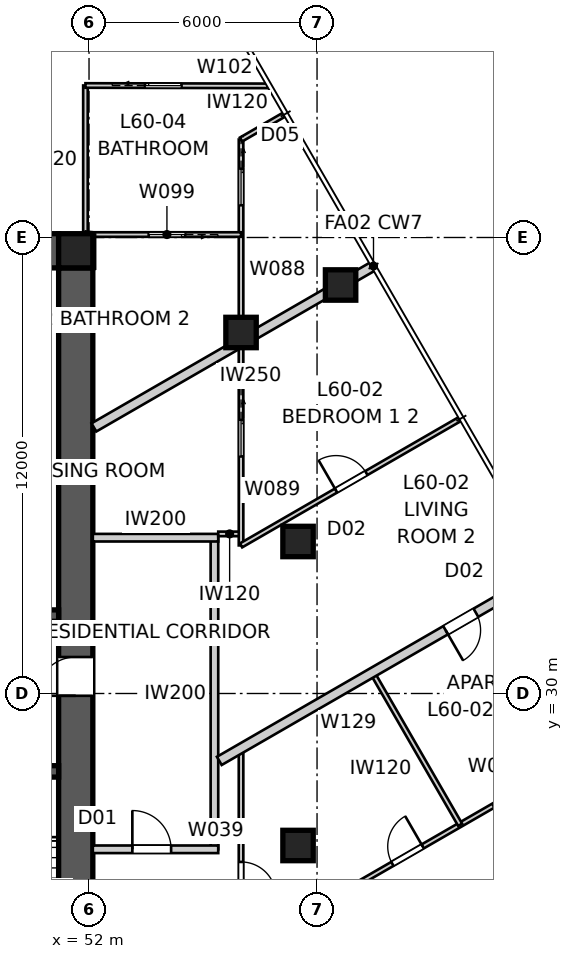
"""IFC4 building model, lengths in metres.
Left out: names, types, materials, properties, quantities, classifications, styles, units other than length and angle.
Written with IfcOpenShell. Run it as: python <this file> out.ifc"""

import sys

from ifc_helpers import new_model, si_unit, direction, frame, frame_2d, origin, origin_2d, place, context, subcontext, project, spatial, polyline, rectangle, outline, extrude, element, fill, save


model = new_model("IFC4")
c1 = context("Model", 3, precision=1e-05, world=origin(), true_north=direction((0.0, 1.0)))
c2 = subcontext(c1, "Body", "Model", "MODEL_VIEW")
j1 = project(units=[si_unit("LENGTHUNIT", "METRE"), si_unit("PLANEANGLEUNIT", "RADIAN")], contexts=[c1])
p1 = place(None, origin())
s1 = spatial("IfcSite", under=j1, at=p1, CompositionType="ELEMENT")
p2 = place(p1, origin())
s2 = spatial("IfcBuilding", under=s1, at=p2, CompositionType="ELEMENT")
p3 = place(p2, frame((0.0, 0.0, 218.4)))
s3 = spatial("IfcBuildingStorey", under=s2, at=p3, CompositionType="ELEMENT", Elevation=218.4)
p4 = place(p3, frame((28.8, 41.65, 0.0), z_axis=(0.0, 0.0, 1.0), x_axis=(1.0, 0.0, 0.0)))
e1 = element("IfcWall", 1, at=p4, inside=s3, PredefinedType="SHEAR", context=c2, shape_type="SweptSolid", body=[
    extrude(outline(polyline([(0.0, -0.45), (22.4, -0.45), (22.4, -0.025), (22.85, -0.025), (22.85, 0.025), (22.4, 0.025), (22.4, 0.45), (0.0, 0.45), (0.0, 0.025), (-0.45, 0.025), (-0.45, -0.025), (0.0, -0.025), (0.0, -0.45)])), origin(), (0.0, 0.0, 1.0), 3.4),
])
p5 = place(p3, frame((51.65, 18.8, 0.0), z_axis=(0.0, 0.0, 1.0), x_axis=(0.0, 1.0, 0.0)))
e2 = element("IfcWall", 2, at=p5, inside=s3, PredefinedType="SHEAR", context=c2, shape_type="SweptSolid", body=[
    extrude(outline(polyline([(0.0, -0.45), (22.4, -0.45), (22.4, -0.025), (22.85, -0.025), (22.85, 0.025), (22.4, 0.025), (22.4, 0.45), (0.0, 0.45), (0.0, 0.025), (-0.45, 0.025), (-0.45, -0.025), (0.0, -0.025), (0.0, -0.45)])), origin(), (0.0, 0.0, 1.0), 3.4),
])
p6 = place(p5, frame((11.14, 0.0, 0.0)))
e3 = element("IfcOpeningElement", 3, at=p6, cuts=e2, PredefinedType="OPENING", context=c2, shape_type="SweptSolid", body=[
    extrude(rectangle(XDim=1.02, YDim=2.4, at=frame_2d((0.51, 1.2))), frame((0.0, 0.46, 0.0), z_axis=(0.0, -1.0, 0.0), x_axis=(1.0, 0.0, 0.0)), (0.0, 0.0, 1.0), 0.92),
])
p7 = place(p3, frame((28.8, 32.05, 0.0), z_axis=(0.0, 0.0, 1.0), x_axis=(1.0, 0.0, 0.0)))
e4 = element("IfcWall", 4, at=p7, inside=s3, PredefinedType="SHEAR", context=c2, shape_type="SweptSolid", body=[
    extrude(rectangle(XDim=22.4, YDim=0.3, at=frame_2d((11.2, 0.0))), origin(), (0.0, 0.0, 1.0), 3.4),
])
p8 = place(p7, frame((19.04, 0.0, 0.0)))
e5 = element("IfcOpeningElement", 5, at=p8, cuts=e4, PredefinedType="OPENING", context=c2, shape_type="SweptSolid", body=[
    extrude(rectangle(XDim=0.92, YDim=2.1, at=frame_2d((0.46, 1.05))), frame((0.0, 0.16, 0.0), z_axis=(0.0, -1.0, 0.0), x_axis=(1.0, 0.0, 0.0)), (0.0, 0.0, 1.0), 0.32),
])
p9 = place(p7, frame((1.265, 0.0, 0.0)))
e6 = element("IfcOpeningElement", 6, at=p9, cuts=e4, PredefinedType="OPENING", context=c2, shape_type="SweptSolid", body=[
    extrude(rectangle(XDim=1.02, YDim=2.1, at=frame_2d((0.51, 1.05))), frame((0.0, 0.16, 0.0), z_axis=(0.0, -1.0, 0.0), x_axis=(1.0, 0.0, 0.0)), (0.0, 0.0, 1.0), 0.32),
])
p10 = place(p7, frame((4.015, 0.0, 0.0)))
e7 = element("IfcOpeningElement", 7, at=p10, cuts=e4, PredefinedType="OPENING", context=c2, shape_type="SweptSolid", body=[
    extrude(rectangle(XDim=0.92, YDim=2.1, at=frame_2d((0.46, 1.05))), frame((0.0, 0.16, 0.0), z_axis=(0.0, -1.0, 0.0), x_axis=(1.0, 0.0, 0.0)), (0.0, 0.0, 1.0), 0.32),
])
p11 = place(p7, frame((6.565, 0.0, 0.0)))
e8 = element("IfcOpeningElement", 8, at=p11, cuts=e4, PredefinedType="OPENING", context=c2, shape_type="SweptSolid", body=[
    extrude(rectangle(XDim=0.92, YDim=2.1, at=frame_2d((0.46, 1.05))), frame((0.0, 0.16, 0.0), z_axis=(0.0, -1.0, 0.0), x_axis=(1.0, 0.0, 0.0)), (0.0, 0.0, 1.0), 0.32),
])
p12 = place(p7, frame((8.89, 0.0, 0.0)))
e9 = element("IfcOpeningElement", 9, at=p12, cuts=e4, PredefinedType="OPENING", context=c2, shape_type="SweptSolid", body=[
    extrude(rectangle(XDim=0.92, YDim=2.1, at=frame_2d((0.46, 1.05))), frame((0.0, 0.16, 0.0), z_axis=(0.0, -1.0, 0.0), x_axis=(1.0, 0.0, 0.0)), (0.0, 0.0, 1.0), 0.32),
])
p13 = place(p7, frame((12.05, 0.0, 0.0)))
e10 = element("IfcOpeningElement", 10, at=p13, cuts=e4, PredefinedType="OPENING", context=c2, shape_type="SweptSolid", body=[
    extrude(rectangle(XDim=1.1, YDim=2.1, at=frame_2d((0.55, 1.05))), frame((0.0, 0.16, 0.0), z_axis=(0.0, -1.0, 0.0), x_axis=(1.0, 0.0, 0.0)), (0.0, 0.0, 1.0), 0.32),
])
p14 = place(p7, frame((14.85, 0.0, 0.0)))
e11 = element("IfcOpeningElement", 11, at=p14, cuts=e4, PredefinedType="OPENING", context=c2, shape_type="SweptSolid", body=[
    extrude(rectangle(XDim=1.1, YDim=2.1, at=frame_2d((0.55, 1.05))), frame((0.0, 0.16, 0.0), z_axis=(0.0, -1.0, 0.0), x_axis=(1.0, 0.0, 0.0)), (0.0, 0.0, 1.0), 0.32),
])
p15 = place(p3, frame((51.2, 27.95, 0.0), z_axis=(0.0, 0.0, 1.0), x_axis=(-1.0, 0.0, 0.0)))
e12 = element("IfcWall", 12, at=p15, inside=s3, PredefinedType="SHEAR", context=c2, shape_type="SweptSolid", body=[
    extrude(rectangle(XDim=22.4, YDim=0.3, at=frame_2d((11.2, 0.0))), origin(), (0.0, 0.0, 1.0), 3.4),
])
p16 = place(p15, frame((19.04, 0.0, 0.0)))
e13 = element("IfcOpeningElement", 13, at=p16, cuts=e12, PredefinedType="OPENING", context=c2, shape_type="SweptSolid", body=[
    extrude(rectangle(XDim=0.92, YDim=2.1, at=frame_2d((0.46, 1.05))), frame((0.0, 0.16, 0.0), z_axis=(0.0, -1.0, 0.0), x_axis=(1.0, 0.0, 0.0)), (0.0, 0.0, 1.0), 0.32),
])
p17 = place(p15, frame((1.265, 0.0, 0.0)))
e14 = element("IfcOpeningElement", 14, at=p17, cuts=e12, PredefinedType="OPENING", context=c2, shape_type="SweptSolid", body=[
    extrude(rectangle(XDim=1.02, YDim=2.1, at=frame_2d((0.51, 1.05))), frame((0.0, 0.16, 0.0), z_axis=(0.0, -1.0, 0.0), x_axis=(1.0, 0.0, 0.0)), (0.0, 0.0, 1.0), 0.32),
])
p18 = place(p15, frame((4.015, 0.0, 0.0)))
e15 = element("IfcOpeningElement", 15, at=p18, cuts=e12, PredefinedType="OPENING", context=c2, shape_type="SweptSolid", body=[
    extrude(rectangle(XDim=0.92, YDim=2.1, at=frame_2d((0.46, 1.05))), frame((0.0, 0.16, 0.0), z_axis=(0.0, -1.0, 0.0), x_axis=(1.0, 0.0, 0.0)), (0.0, 0.0, 1.0), 0.32),
])
p19 = place(p15, frame((8.89, 0.0, 0.0)))
e16 = element("IfcOpeningElement", 16, at=p19, cuts=e12, PredefinedType="OPENING", context=c2, shape_type="SweptSolid", body=[
    extrude(rectangle(XDim=0.92, YDim=2.1, at=frame_2d((0.46, 1.05))), frame((0.0, 0.16, 0.0), z_axis=(0.0, -1.0, 0.0), x_axis=(1.0, 0.0, 0.0)), (0.0, 0.0, 1.0), 0.32),
])
p20 = place(p15, frame((6.565, 0.0, 0.0)))
e17 = element("IfcOpeningElement", 17, at=p20, cuts=e12, PredefinedType="OPENING", context=c2, shape_type="SweptSolid", body=[
    extrude(rectangle(XDim=0.92, YDim=2.1, at=frame_2d((0.46, 1.05))), frame((0.0, 0.16, 0.0), z_axis=(0.0, -1.0, 0.0), x_axis=(1.0, 0.0, 0.0)), (0.0, 0.0, 1.0), 0.32),
])
p21 = place(p15, frame((12.05, 0.0, 0.0)))
e18 = element("IfcOpeningElement", 18, at=p21, cuts=e12, PredefinedType="OPENING", context=c2, shape_type="SweptSolid", body=[
    extrude(rectangle(XDim=1.1, YDim=2.1, at=frame_2d((0.55, 1.05))), frame((0.0, 0.16, 0.0), z_axis=(0.0, -1.0, 0.0), x_axis=(1.0, 0.0, 0.0)), (0.0, 0.0, 1.0), 0.32),
])
p22 = place(p15, frame((14.85, 0.0, 0.0)))
e19 = element("IfcOpeningElement", 19, at=p22, cuts=e12, PredefinedType="OPENING", context=c2, shape_type="SweptSolid", body=[
    extrude(rectangle(XDim=1.1, YDim=2.1, at=frame_2d((0.55, 1.05))), frame((0.0, 0.16, 0.0), z_axis=(0.0, -1.0, 0.0), x_axis=(1.0, 0.0, 0.0)), (0.0, 0.0, 1.0), 0.32),
])
p23 = place(p3, frame((51.65, 41.65, 0.0), z_axis=(0.0, 0.0, 1.0), x_axis=(1.0, 0.0, 0.0)))
e20 = element("IfcColumn", 20, at=p23, inside=s3, PredefinedType="COLUMN", context=c2, shape_type="SweptSolid", body=[
    extrude(rectangle(XDim=0.9, YDim=0.9, at=origin_2d()), origin(), (0.0, 0.0, 1.0), 3.4),
])
for number, where, z_axis, x_axis in (
    (21, (58.62, 40.75, 0.0), (0.0, 0.0, 1.0), (1.0, 0.0, 0.0)),
    (22, (57.5, 26.0, 0.0), (0.0, 0.0, 1.0), (1.0, 0.0, 0.0)),
    (23, (57.5, 34.0, 0.0), (0.0, 0.0, 1.0), (1.0, 0.0, 0.0)),
    (24, (56.0, 39.5, 0.0), (0.0, 0.0, 1.0), (1.0, 0.0, 0.0)),
):
    element("IfcColumn", number, at=place(p3, frame(where, z_axis=z_axis, x_axis=x_axis)), inside=s3, PredefinedType="COLUMN", context=c2, shape_type="SweptSolid", body=[
        extrude(rectangle(XDim=0.8, YDim=0.8, at=origin_2d()), origin(), (0.0, 0.0, 1.0), 3.4),
    ])
p24 = place(p3, frame((55.3, 25.9, 0.0), z_axis=(0.0, 0.0, 1.0), x_axis=(0.0, 1.0, 0.0)))
e25 = element("IfcWall", 25, at=p24, inside=s3, PredefinedType="PARTITIONING", context=c2, shape_type="SweptSolid", body=[
    extrude(rectangle(XDim=8.2, YDim=0.2, at=frame_2d((4.1, 0.0))), origin(), (0.0, 0.0, 1.0), 3.25),
])
p25 = place(p3, frame((52.1, 34.1, 0.0), z_axis=(0.0, 0.0, 1.0), x_axis=(1.0, 0.0, 0.0)))
e26 = element("IfcWall", 26, at=p25, inside=s3, PredefinedType="PARTITIONING", context=c2, shape_type="SweptSolid", body=[
    extrude(rectangle(XDim=3.3, YDim=0.2, at=frame_2d((1.65, 0.0))), origin(), (0.0, 0.0, 1.0), 3.25),
])
p26 = place(p3, frame((52.1, 25.9, 0.0), z_axis=(0.0, 0.0, 1.0), x_axis=(1.0, 0.0, 0.0)))
e27 = element("IfcWall", 27, at=p26, inside=s3, PredefinedType="PARTITIONING", context=c2, shape_type="SweptSolid", body=[
    extrude(rectangle(XDim=3.3, YDim=0.2, at=frame_2d((1.65, 0.0))), origin(), (0.0, 0.0, 1.0), 3.25),
])
p27 = place(p26, frame((1.04, 0.0, 0.0)))
e28 = element("IfcOpeningElement", 28, at=p27, cuts=e27, PredefinedType="OPENING", context=c2, shape_type="SweptSolid", body=[
    extrude(rectangle(XDim=1.02, YDim=2.34, at=frame_2d((0.51, 1.17))), frame((0.0, 0.11, 0.0), z_axis=(0.0, -1.0, 0.0), x_axis=(1.0, 0.0, 0.0)), (0.0, 0.0, 1.0), 0.22),
])
p28 = place(p3, frame((59.486, 41.25, 0.0), z_axis=(0.0, 0.0, 1.0), x_axis=(-0.866020489494, -0.500008511703, 0.0)))
e29 = element("IfcWall", 29, at=p28, inside=s3, PredefinedType="PARTITIONING", context=c2, shape_type="SweptSolid", body=[
    extrude(rectangle(XDim=8.496, YDim=0.25, at=frame_2d((4.248, 0.0))), origin(), (0.0, 0.0, 1.0), 3.25),
])
p29 = place(p3, frame((64.111, 33.239, 0.0), z_axis=(0.0, 0.0, 1.0), x_axis=(-0.866024190901, -0.50000210077, 0.0)))
e30 = element("IfcWall", 30, at=p29, inside=s3, PredefinedType="PARTITIONING", context=c2, shape_type="SweptSolid", body=[
    extrude(rectangle(XDim=10.026, YDim=0.25, at=frame_2d((5.013, 0.0))), origin(), (0.0, 0.0, 1.0), 3.25),
])
p30 = place(p29, frame((2.229, 0.0, 0.0)))
e31 = element("IfcOpeningElement", 31, at=p30, cuts=e30, PredefinedType="OPENING", context=c2, shape_type="SweptSolid", body=[
    extrude(rectangle(XDim=0.92, YDim=2.34, at=frame_2d((0.46, 1.17))), frame((0.0, 0.135, 0.0), z_axis=(0.0, -1.0, 0.0), x_axis=(1.0, 0.0, 0.0)), (0.0, 0.0, 1.0), 0.27),
])
p31 = place(p3, frame((56.0, 28.557, 0.0), z_axis=(0.0, 0.0, 1.0), x_axis=(0.0, -1.0, 0.0)))
e32 = element("IfcWall", 32, at=p31, inside=s3, PredefinedType="PARTITIONING", context=c2, shape_type="SweptSolid", body=[
    extrude(rectangle(XDim=10.601, YDim=0.12, at=frame_2d((5.3, 0.0))), origin(), (0.0, 0.0, 1.0), 2.55),
])
p32 = place(p31, frame((2.989, 0.0, 0.0)))
e33 = element("IfcOpeningElement", 33, at=p32, cuts=e32, PredefinedType="OPENING", context=c2, shape_type="SweptSolid", body=[
    extrude(rectangle(XDim=0.92, YDim=2.34, at=frame_2d((0.46, 1.17))), frame((0.0, 0.07, 0.0), z_axis=(0.0, -1.0, 0.0), x_axis=(1.0, 0.0, 0.0)), (0.0, 0.0, 1.0), 0.14),
])
p33 = place(p3, frame((56.0, 23.216, 0.0), z_axis=(0.0, 0.0, 1.0), x_axis=(0.866023917076, 0.500002575046, 0.0)))
e34 = element("IfcWall", 34, at=p33, inside=s3, PredefinedType="PARTITIONING", context=c2, shape_type="SweptSolid", body=[
    extrude(rectangle(XDim=11.996, YDim=0.12, at=frame_2d((5.998, 0.0))), origin(), (0.0, 0.0, 1.0), 3.25),
])
p34 = place(p33, frame((1.245, 0.0, 0.0)))
e35 = element("IfcOpeningElement", 35, at=p34, cuts=e34, PredefinedType="OPENING", context=c2, shape_type="SweptSolid", body=[
    extrude(rectangle(XDim=0.92, YDim=2.34, at=frame_2d((0.46, 1.17))), frame((0.0, 0.07, 0.0), z_axis=(0.0, -1.0, 0.0), x_axis=(1.0, 0.0, 0.0)), (0.0, 0.0, 1.0), 0.14),
])
p35 = place(p33, frame((4.599, 0.0, 0.0)))
e36 = element("IfcOpeningElement", 36, at=p35, cuts=e34, PredefinedType="OPENING", context=c2, shape_type="SweptSolid", body=[
    extrude(rectangle(XDim=0.92, YDim=2.34, at=frame_2d((0.46, 1.17))), frame((0.0, 0.07, 0.0), z_axis=(0.0, -1.0, 0.0), x_axis=(1.0, 0.0, 0.0)), (0.0, 0.0, 1.0), 0.14),
])
p36 = place(p33, frame((9.394, 0.0, 0.0)))
e37 = element("IfcOpeningElement", 37, at=p36, cuts=e34, PredefinedType="OPENING", context=c2, shape_type="SweptSolid", body=[
    extrude(rectangle(XDim=0.92, YDim=2.34, at=frame_2d((0.46, 1.17))), frame((0.0, 0.07, 0.0), z_axis=(0.0, -1.0, 0.0), x_axis=(1.0, 0.0, 0.0)), (0.0, 0.0, 1.0), 0.14),
])
p37 = place(p3, frame((61.766, 26.545, 0.0), z_axis=(0.0, 0.0, 1.0), x_axis=(-0.499999662836, 0.866025598446, 0.0)))
e38 = element("IfcWall", 38, at=p37, inside=s3, PredefinedType="PARTITIONING", context=c2, shape_type="SweptSolid", body=[
    extrude(rectangle(XDim=4.625, YDim=0.12, at=frame_2d((2.312, 0.0))), origin(), (0.0, 0.0, 1.0), 3.25),
])
p38 = place(p3, frame((56.0, 34.2, 0.0), z_axis=(0.0, 0.0, 1.0), x_axis=(-1.0, 0.0, 0.0)))
e39 = element("IfcWall", 39, at=p38, inside=s3, PredefinedType="PARTITIONING", context=c2, shape_type="SweptSolid", body=[
    extrude(rectangle(XDim=0.6, YDim=0.12, at=frame_2d((0.3, 0.0))), origin(), (0.0, 0.0, 1.0), 3.25),
])
p39 = place(p3, frame((56.0, 44.578, 0.0), z_axis=(0.0, 0.0, 1.0), x_axis=(0.0, -1.0, 0.0)))
e40 = element("IfcWall", 40, at=p39, inside=s3, PredefinedType="PARTITIONING", context=c2, shape_type="SweptSolid", body=[
    extrude(rectangle(XDim=10.681, YDim=0.12, at=frame_2d((5.34, 0.0))), origin(), (0.0, 0.0, 1.0), 2.55),
])
p40 = place(p39, frame((0.77, 0.0, 0.0)))
e41 = element("IfcOpeningElement", 41, at=p40, cuts=e40, PredefinedType="OPENING", context=c2, shape_type="SweptSolid", body=[
    extrude(rectangle(XDim=0.96, YDim=2.1, at=frame_2d((0.48, 1.05))), frame((0.0, 0.07, 0.0), z_axis=(0.0, -1.0, 0.0), x_axis=(1.0, 0.0, 0.0)), (0.0, 0.0, 1.0), 0.14),
])
p41 = place(p39, frame((7.379, 0.0, 0.0)))
e42 = element("IfcOpeningElement", 42, at=p41, cuts=e40, PredefinedType="OPENING", context=c2, shape_type="SweptSolid", body=[
    extrude(rectangle(XDim=0.96, YDim=2.1, at=frame_2d((0.48, 1.05))), frame((0.0, 0.07, 0.0), z_axis=(0.0, -1.0, 0.0), x_axis=(1.0, 0.0, 0.0)), (0.0, 0.0, 1.0), 0.14),
])
p42 = place(p3, frame((56.0, 33.897, 0.0), z_axis=(0.0, 0.0, 1.0), x_axis=(0.866033470286, 0.49998602815, 0.0)))
e43 = element("IfcWall", 43, at=p42, inside=s3, PredefinedType="PARTITIONING", context=c2, shape_type="SweptSolid", body=[
    extrude(rectangle(XDim=6.655, YDim=0.12, at=frame_2d((3.328, 0.0))), origin(), (0.0, 0.0, 1.0), 3.25),
])
p43 = place(p42, frame((2.887, 0.0, 0.0)))
e44 = element("IfcOpeningElement", 44, at=p43, cuts=e43, PredefinedType="OPENING", context=c2, shape_type="SweptSolid", body=[
    extrude(rectangle(XDim=0.92, YDim=2.34, at=frame_2d((0.46, 1.17))), frame((0.0, 0.07, 0.0), z_axis=(0.0, -1.0, 0.0), x_axis=(1.0, 0.0, 0.0)), (0.0, 0.0, 1.0), 0.14),
])
p44 = place(p3, frame((56.0, 42.078, 0.0), z_axis=(0.0, 0.0, 1.0), x_axis=(-1.0, 0.0, 0.0)))
e45 = element("IfcWall", 45, at=p44, inside=s3, PredefinedType="PARTITIONING", context=c2, shape_type="SweptSolid", body=[
    extrude(rectangle(XDim=3.9, YDim=0.12, at=frame_2d((1.95, 0.0))), origin(), (0.0, 0.0, 1.0), 3.25),
])
p45 = place(p44, frame((1.47, 0.0, 0.0)))
e46 = element("IfcOpeningElement", 46, at=p45, cuts=e45, PredefinedType="OPENING", context=c2, shape_type="SweptSolid", body=[
    extrude(rectangle(XDim=0.96, YDim=2.1, at=frame_2d((0.48, 1.05))), frame((0.0, 0.07, 0.0), z_axis=(0.0, -1.0, 0.0), x_axis=(1.0, 0.0, 0.0)), (0.0, 0.0, 1.0), 0.14),
])
p46 = place(p3, frame((51.906, 42.1, 0.0), z_axis=(0.0, 0.0, 1.0), x_axis=(0.0, 1.0, 0.0)))
e47 = element("IfcWall", 47, at=p46, inside=s3, PredefinedType="PARTITIONING", context=c2, shape_type="SweptSolid", body=[
    extrude(rectangle(XDim=3.9, YDim=0.12, at=frame_2d((1.95, 0.0))), origin(), (0.0, 0.0, 1.0), 3.25),
])
p47 = place(p3, frame((51.906, 46.0, 0.0), z_axis=(0.0, 0.0, 1.0), x_axis=(0.999997822794, -0.002086721841, 0.0)))
e48 = element("IfcWall", 48, at=p47, inside=s3, PredefinedType="PARTITIONING", context=c2, shape_type="SweptSolid", body=[
    extrude(rectangle(XDim=4.797, YDim=0.12, at=frame_2d((2.398, 0.0))), origin(), (0.0, 0.0, 1.0), 3.25),
])
p48 = place(p47, frame((1.567, 0.0, 0.0)))
e49 = element("IfcOpeningElement", 49, at=p48, cuts=e48, PredefinedType="OPENING", context=c2, shape_type="SweptSolid", body=[
    extrude(rectangle(XDim=0.96, YDim=2.1, at=frame_2d((0.48, 1.05))), frame((0.0, 0.07, 0.0), z_axis=(0.0, -1.0, 0.0), x_axis=(1.0, 0.0, 0.0)), (0.0, 0.0, 1.0), 0.14),
])
p49 = place(p3, frame((57.138, 45.235, 0.0), z_axis=(0.0, 0.0, 1.0), x_axis=(-0.866040225545, -0.499974327079, 0.0)))
e50 = element("IfcWall", 50, at=p49, inside=s3, PredefinedType="PARTITIONING", context=c2, shape_type="SweptSolid", body=[
    extrude(rectangle(XDim=1.314, YDim=0.12, at=frame_2d((0.657, 0.0))), origin(), (0.0, 0.0, 1.0), 3.25),
])
p50 = place(p3, frame((52.1, 41.18, 0.0), z_axis=(0.0, 0.0, 1.0), x_axis=(0.0, 1.0, 0.0)))
e51 = element("IfcWall", 51, at=p50, inside=s3, PredefinedType="PARTITIONING", context=c2, shape_type="SweptSolid", body=[
    extrude(rectangle(XDim=0.898, YDim=0.12, at=frame_2d((0.449, 0.0))), origin(), (0.0, 0.0, 1.0), 3.25),
])
p51 = place(p3, frame((54.826, 49.241, 0.0), z_axis=(0.0, 0.0, 1.0), x_axis=(-0.866023120914, -0.500003954026, 0.0)))
e52 = element("IfcWall", 52, at=p51, inside=s3, PredefinedType="PARTITIONING", context=c2, shape_type="SweptSolid", body=[
    extrude(rectangle(XDim=6.481, YDim=0.12, at=frame_2d((3.241, 0.0))), origin(), (0.0, 0.0, 1.0), 3.25),
])
p52 = place(p3, frame((51.906, 42.1, 0.0), z_axis=(0.0, 0.0, 1.0), x_axis=(0.993387055489, -0.114813579278, 0.0)))
e53 = element("IfcWall", 53, at=p52, inside=s3, PredefinedType="PARTITIONING", context=c2, shape_type="SweptSolid", body=[
    extrude(rectangle(XDim=0.196, YDim=0.12, at=frame_2d((0.098, 0.0))), origin(), (0.0, 0.0, 1.0), 3.25),
])
p53 = place(p27, origin())
e54 = element("IfcDoor", 54, at=p53, inside=s3, OperationType="SINGLE_SWING_LEFT", PredefinedType="DOOR", context=c2, shape_type="SweptSolid", body=[
    extrude(rectangle(XDim=1.02, YDim=2.34, at=frame_2d((0.51, 1.17))), frame((0.0, 0.025, 0.0), z_axis=(0.0, -1.0, 0.0), x_axis=(1.0, 0.0, 0.0)), (0.0, 0.0, 1.0), 0.05),
])
fill(e28, e54)
p54 = place(p32, origin())
e55 = element("IfcDoor", 55, at=p54, inside=s3, OperationType="SINGLE_SWING_RIGHT", PredefinedType="DOOR", context=c2, shape_type="SweptSolid", body=[
    extrude(rectangle(XDim=0.92, YDim=2.34, at=frame_2d((0.46, 1.17))), frame((0.0, 0.025, 0.0), z_axis=(0.0, -1.0, 0.0), x_axis=(1.0, 0.0, 0.0)), (0.0, 0.0, 1.0), 0.05),
])
fill(e33, e55)
p55 = place(p43, origin())
e56 = element("IfcDoor", 56, at=p55, inside=s3, OperationType="SINGLE_SWING_LEFT", PredefinedType="DOOR", context=c2, shape_type="SweptSolid", body=[
    extrude(rectangle(XDim=0.92, YDim=2.34, at=frame_2d((0.46, 1.17))), frame((0.0, 0.025, 0.0), z_axis=(0.0, -1.0, 0.0), x_axis=(1.0, 0.0, 0.0)), (0.0, 0.0, 1.0), 0.05),
])
fill(e44, e56)
p56 = place(p30, origin())
e57 = element("IfcDoor", 57, at=p56, inside=s3, OperationType="SINGLE_SWING_RIGHT", PredefinedType="DOOR", context=c2, shape_type="SweptSolid", body=[
    extrude(rectangle(XDim=0.92, YDim=2.34, at=frame_2d((0.46, 1.17))), frame((0.0, 0.025, 0.0), z_axis=(0.0, -1.0, 0.0), x_axis=(1.0, 0.0, 0.0)), (0.0, 0.0, 1.0), 0.05),
])
fill(e31, e57)
p57 = place(p35, origin())
e58 = element("IfcDoor", 58, at=p57, inside=s3, OperationType="SINGLE_SWING_RIGHT", PredefinedType="DOOR", context=c2, shape_type="SweptSolid", body=[
    extrude(rectangle(XDim=0.92, YDim=2.34, at=frame_2d((0.46, 1.17))), frame((0.0, 0.025, 0.0), z_axis=(0.0, -1.0, 0.0), x_axis=(1.0, 0.0, 0.0)), (0.0, 0.0, 1.0), 0.05),
])
fill(e36, e58)
p58 = place(p48, origin())
e59 = element("IfcDoor", 59, at=p58, inside=s3, OperationType="SLIDING_TO_LEFT", PredefinedType="DOOR", context=c2, shape_type="SweptSolid", body=[
    extrude(rectangle(XDim=0.96, YDim=2.1, at=frame_2d((0.48, 1.05))), frame((0.0, 0.025, 0.0), z_axis=(0.0, -1.0, 0.0), x_axis=(1.0, 0.0, 0.0)), (0.0, 0.0, 1.0), 0.05),
])
fill(e49, e59)
p59 = place(p45, origin())
e60 = element("IfcDoor", 60, at=p59, inside=s3, OperationType="SLIDING_TO_LEFT", PredefinedType="DOOR", context=c2, shape_type="SweptSolid", body=[
    extrude(rectangle(XDim=0.96, YDim=2.1, at=frame_2d((0.48, 1.05))), frame((0.0, 0.025, 0.0), z_axis=(0.0, -1.0, 0.0), x_axis=(1.0, 0.0, 0.0)), (0.0, 0.0, 1.0), 0.05),
])
fill(e46, e60)
p60 = place(p40, origin())
e61 = element("IfcDoor", 61, at=p60, inside=s3, OperationType="SLIDING_TO_LEFT", PredefinedType="DOOR", context=c2, shape_type="SweptSolid", body=[
    extrude(rectangle(XDim=0.96, YDim=2.1, at=frame_2d((0.48, 1.05))), frame((0.0, 0.025, 0.0), z_axis=(0.0, -1.0, 0.0), x_axis=(1.0, 0.0, 0.0)), (0.0, 0.0, 1.0), 0.05),
])
fill(e41, e61)
p61 = place(p41, origin())
e62 = element("IfcDoor", 62, at=p61, inside=s3, OperationType="SLIDING_TO_LEFT", PredefinedType="DOOR", context=c2, shape_type="SweptSolid", body=[
    extrude(rectangle(XDim=0.96, YDim=2.1, at=frame_2d((0.48, 1.05))), frame((0.0, 0.025, 0.0), z_axis=(0.0, -1.0, 0.0), x_axis=(1.0, 0.0, 0.0)), (0.0, 0.0, 1.0), 0.05),
])
fill(e42, e62)
p62 = place(p6, origin())
e63 = element("IfcDoor", 63, at=p62, inside=s3, OperationType="SINGLE_SWING_LEFT", PredefinedType="DOOR", context=c2, shape_type="SweptSolid", body=[
    extrude(rectangle(XDim=1.02, YDim=2.4, at=frame_2d((0.51, 1.2))), frame((0.0, 0.025, 0.0), z_axis=(0.0, -1.0, 0.0), x_axis=(1.0, 0.0, 0.0)), (0.0, 0.0, 1.0), 0.05),
])
fill(e3, e63)
save(model, sys.argv[1])
